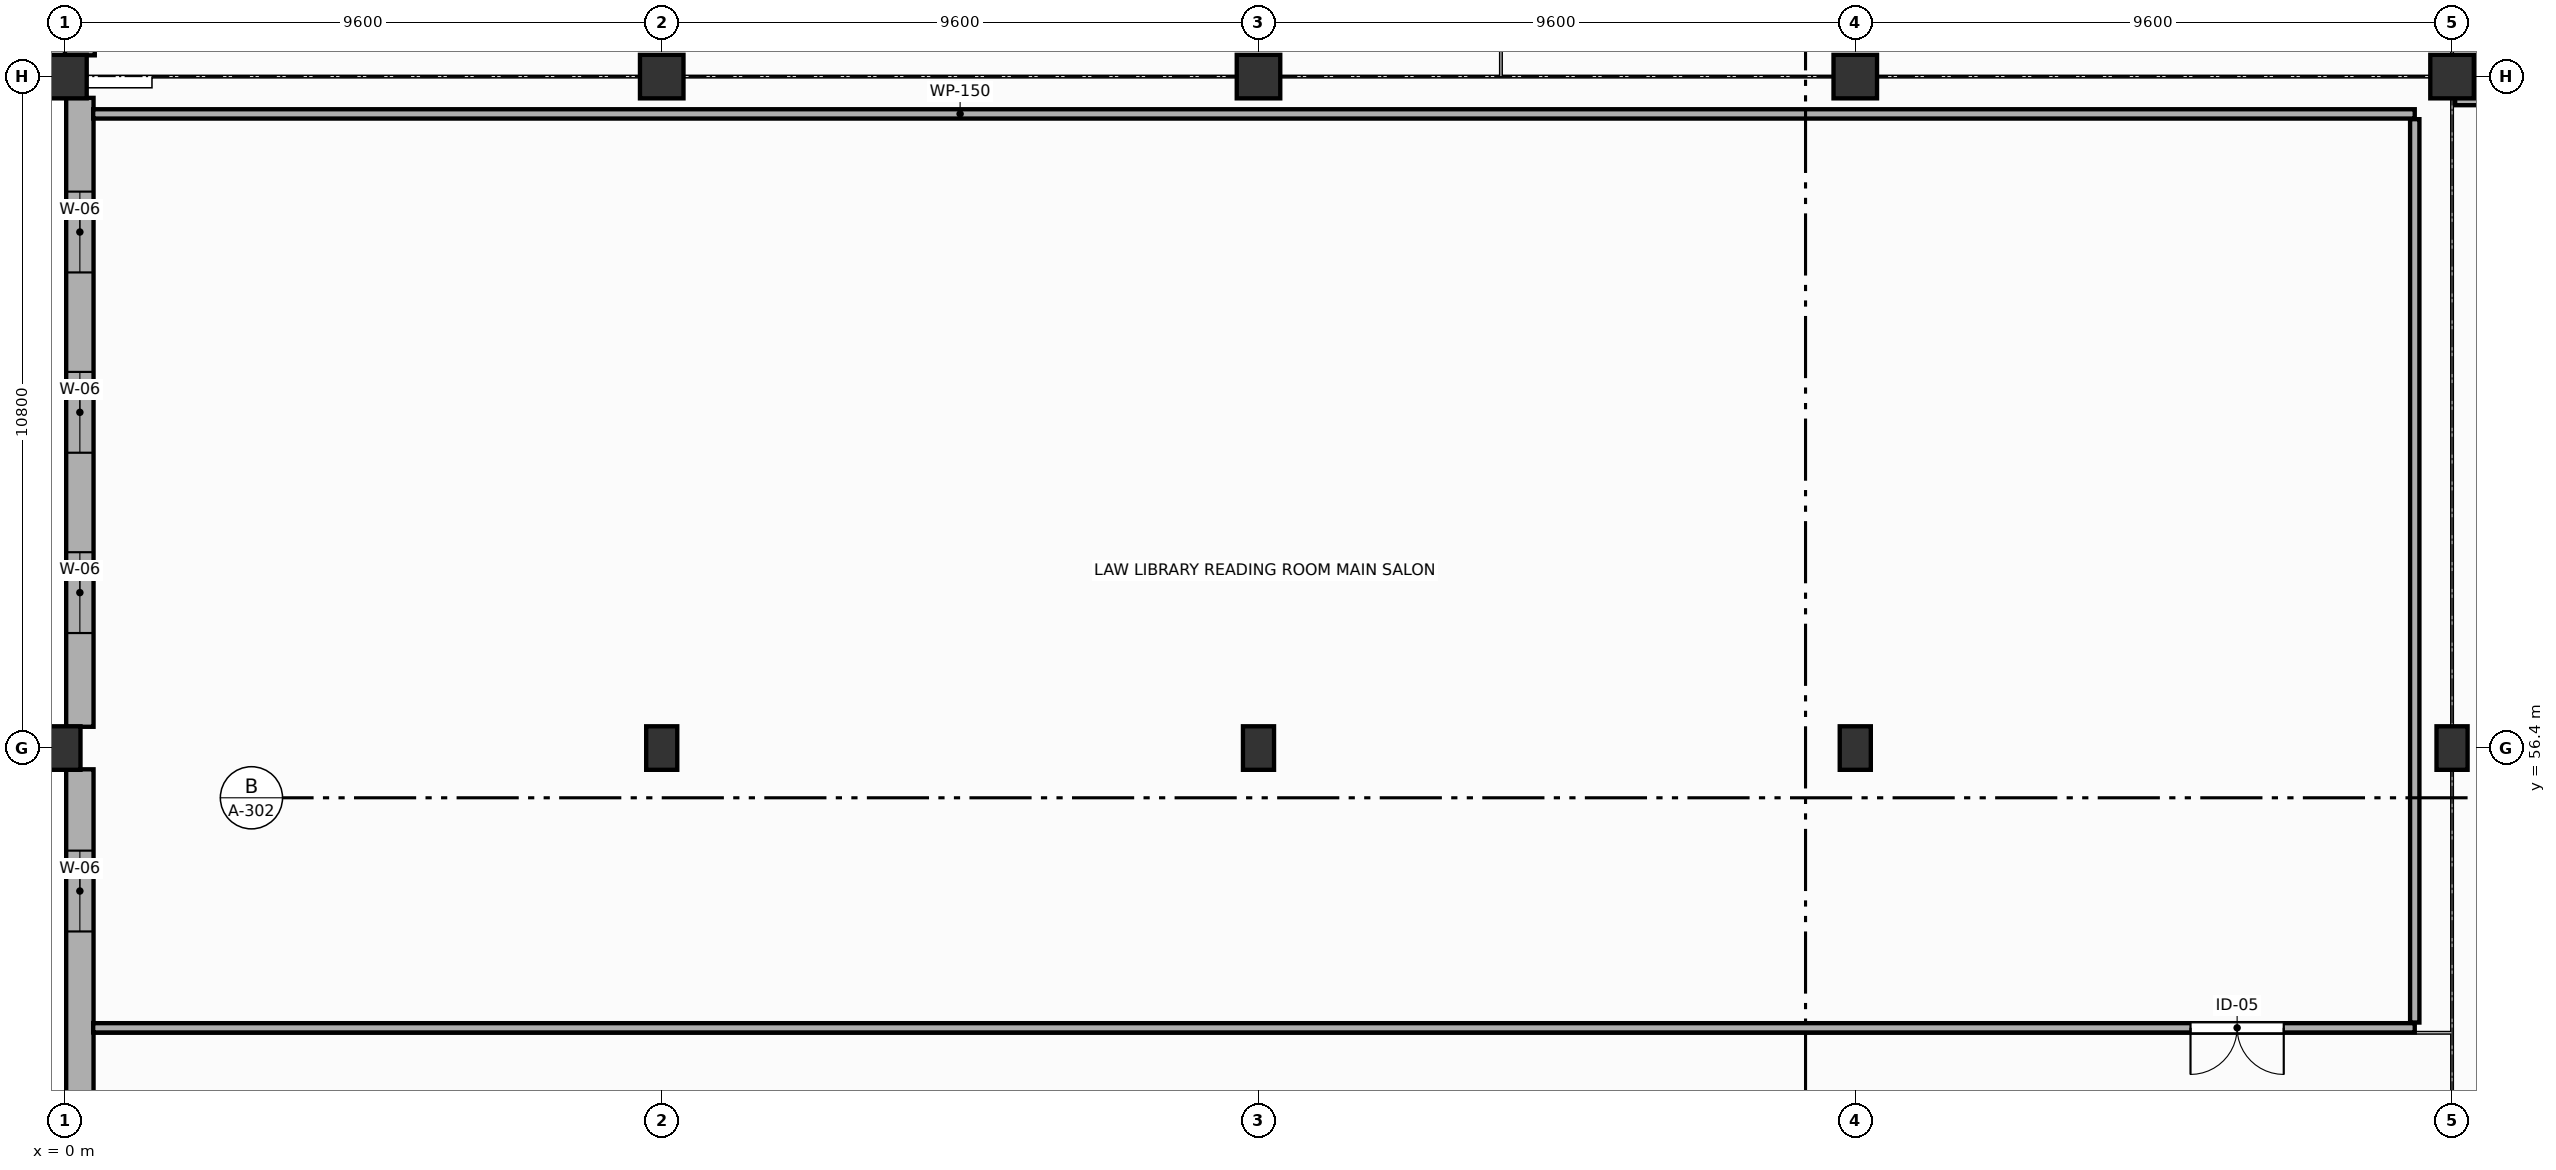
"""IFC4 building model, lengths in metres.
Left out: names, types, materials, properties, quantities, classifications, styles, units other than length and angle.
Written with IfcOpenShell. Run it as: python <this file> out.ifc"""

import sys

from ifc_helpers import new_model, si_unit, direction, frame, frame_2d, origin, origin_2d, place, context, subcontext, project, spatial, rectangle, extrude, element, fill, save


model = new_model("IFC4")
c1 = context("Model", 3, precision=1e-05, world=origin(), true_north=direction((0.0, 1.0)))
c2 = subcontext(c1, "Body", "Model", "MODEL_VIEW")
j1 = project(units=[si_unit("LENGTHUNIT", "METRE"), si_unit("PLANEANGLEUNIT", "RADIAN")], contexts=[c1])
p1 = place(None, origin())
s1 = spatial("IfcSite", under=j1, at=p1, CompositionType="ELEMENT")
p2 = place(p1, origin())
s2 = spatial("IfcBuilding", under=s1, at=p2, CompositionType="ELEMENT")
p3 = place(p2, frame((0.0, 0.0, 5.4)))
s3 = spatial("IfcBuildingStorey", under=s2, at=p3, CompositionType="ELEMENT", Elevation=5.4)
for number, where, z_axis, x_axis in (
    (1, (0.0, 67.2, 0.0), (0.0, 0.0, 1.0), (1.0, 0.0, 0.0)),
    (2, (9.6, 67.2, 0.0), (0.0, 0.0, 1.0), (1.0, 0.0, 0.0)),
    (3, (19.2, 67.2, 0.0), (0.0, 0.0, 1.0), (1.0, 0.0, 0.0)),
    (4, (28.8, 67.2, 0.0), (0.0, 0.0, 1.0), (1.0, 0.0, 0.0)),
    (5, (38.4, 67.2, 0.0), (0.0, 0.0, 1.0), (1.0, 0.0, 0.0)),
):
    element("IfcColumn", number, at=place(p3, frame(where, z_axis=z_axis, x_axis=x_axis)), inside=s3, PredefinedType="COLUMN", context=c2, shape_type="SweptSolid", body=[
        extrude(rectangle(XDim=0.7, YDim=0.7, at=origin_2d()), origin(), (0.0, 0.0, 1.0), 4.5),
    ])
for number, where, z_axis, x_axis in (
    (6, (0.0, 56.4, 0.0), (0.0, 0.0, 1.0), (1.0, 0.0, 0.0)),
    (7, (9.6, 56.4, 0.0), (0.0, 0.0, 1.0), (1.0, 0.0, 0.0)),
    (8, (19.2, 56.4, 0.0), (0.0, 0.0, 1.0), (1.0, 0.0, 0.0)),
    (9, (28.8, 56.4, 0.0), (0.0, 0.0, 1.0), (1.0, 0.0, 0.0)),
    (10, (38.4, 56.4, 0.0), (0.0, 0.0, 1.0), (1.0, 0.0, 0.0)),
):
    element("IfcColumn", number, at=place(p3, frame(where, z_axis=z_axis, x_axis=x_axis)), inside=s3, PredefinedType="COLUMN", context=c2, shape_type="SweptSolid", body=[
        extrude(rectangle(XDim=0.5, YDim=0.7, at=origin_2d()), origin(), (0.0, 0.0, 1.0), 4.5),
    ])
p4 = place(p3, frame((0.24, 67.542, 0.0), z_axis=(0.0, 0.0, 1.0), x_axis=(0.0, 1.0, 0.0)))
e11 = element("IfcWall", 11, at=p4, inside=s3, PredefinedType="STANDARD", context=c2, shape_type="SweptSolid", body=[
    extrude(rectangle(XDim=6.521, YDim=0.48, at=frame_2d((3.26, 0.0))), origin(), (0.0, 0.0, 1.0), 3.38),
])
p5 = place(p4, frame((1.303, 0.0, 0.85)))
e12 = element("IfcOpeningElement", 12, at=p5, cuts=e11, PredefinedType="OPENING", context=c2, shape_type="SweptSolid", body=[
    extrude(rectangle(XDim=1.7, YDim=2.3, at=frame_2d((0.85, 1.15))), frame((0.0, 0.25, 0.0), z_axis=(0.0, -1.0, 0.0), x_axis=(1.0, 0.0, 0.0)), (0.0, 0.0, 1.0), 0.5),
])
p6 = place(p4, frame((3.753, 0.0, 0.85)))
e13 = element("IfcOpeningElement", 13, at=p6, cuts=e11, PredefinedType="OPENING", context=c2, shape_type="SweptSolid", body=[
    extrude(rectangle(XDim=1.7, YDim=2.3, at=frame_2d((0.85, 1.15))), frame((0.0, 0.25, 0.0), z_axis=(0.0, -1.0, 0.0), x_axis=(1.0, 0.0, 0.0)), (0.0, 0.0, 1.0), 0.5),
])
p7 = place(p3, frame((0.24, 47.142, 0.0), z_axis=(0.0, 0.0, 1.0), x_axis=(0.0, 1.0, 0.0)))
e14 = element("IfcWall", 14, at=p7, inside=s3, PredefinedType="STANDARD", context=c2, shape_type="SweptSolid", body=[
    extrude(rectangle(XDim=8.916, YDim=0.44, at=frame_2d((4.458, 0.0))), origin(), (0.0, 0.0, 1.0), 3.38),
])
p8 = place(p7, frame((6.308, 0.0, 0.9)))
e15 = element("IfcOpeningElement", 15, at=p8, cuts=e14, PredefinedType="OPENING", context=c2, shape_type="SweptSolid", body=[
    extrude(rectangle(XDim=1.3, YDim=2.1, at=frame_2d((0.65, 1.05))), frame((0.0, 0.23, 0.0), z_axis=(0.0, -1.0, 0.0), x_axis=(1.0, 0.0, 0.0)), (0.0, 0.0, 1.0), 0.46),
])
p9 = place(p3, frame((0.24, 56.742, 0.0), z_axis=(0.0, 0.0, 1.0), x_axis=(0.0, 1.0, 0.0)))
e16 = element("IfcWall", 16, at=p9, inside=s3, PredefinedType="STANDARD", context=c2, shape_type="SweptSolid", body=[
    extrude(rectangle(XDim=10.116, YDim=0.44, at=frame_2d((5.058, 0.0))), origin(), (0.0, 0.0, 1.0), 3.38),
])
p10 = place(p9, frame((1.508, 0.0, 0.9)))
e17 = element("IfcOpeningElement", 17, at=p10, cuts=e16, PredefinedType="OPENING", context=c2, shape_type="SweptSolid", body=[
    extrude(rectangle(XDim=1.3, YDim=2.1, at=frame_2d((0.65, 1.05))), frame((0.0, 0.23, 0.0), z_axis=(0.0, -1.0, 0.0), x_axis=(1.0, 0.0, 0.0)), (0.0, 0.0, 1.0), 0.46),
])
p11 = place(p9, frame((4.408, 0.0, 0.9)))
e18 = element("IfcOpeningElement", 18, at=p11, cuts=e16, PredefinedType="OPENING", context=c2, shape_type="SweptSolid", body=[
    extrude(rectangle(XDim=1.3, YDim=2.1, at=frame_2d((0.65, 1.05))), frame((0.0, 0.23, 0.0), z_axis=(0.0, -1.0, 0.0), x_axis=(1.0, 0.0, 0.0)), (0.0, 0.0, 1.0), 0.46),
])
p12 = place(p9, frame((7.308, 0.0, 0.9)))
e19 = element("IfcOpeningElement", 19, at=p12, cuts=e16, PredefinedType="OPENING", context=c2, shape_type="SweptSolid", body=[
    extrude(rectangle(XDim=1.3, YDim=2.1, at=frame_2d((0.65, 1.05))), frame((0.0, 0.23, 0.0), z_axis=(0.0, -1.0, 0.0), x_axis=(1.0, 0.0, 0.0)), (0.0, 0.0, 1.0), 0.46),
])
p13 = place(p3, frame((38.45, 66.96, 0.0), z_axis=(0.0, 0.0, 1.0), x_axis=(1.0, 0.0, 0.0)))
e20 = element("IfcWall", 20, at=p13, inside=s3, PredefinedType="STANDARD", context=c2, shape_type="SweptSolid", body=[
    extrude(rectangle(XDim=7.55, YDim=0.44, at=frame_2d((3.775, 0.0))), origin(), (0.0, 0.0, 1.0), 3.23),
])
p14 = place(p3, frame((0.454, 66.6, 0.0), z_axis=(0.0, 0.0, 1.0), x_axis=(1.0, 0.0, 0.0)))
e21 = element("IfcWall", 21, at=p14, inside=s3, PredefinedType="PARTITIONING", context=c2, shape_type="SweptSolid", body=[
    extrude(rectangle(XDim=37.346, YDim=0.15, at=frame_2d((18.673, 0.0))), origin(), (0.0, 0.0, 1.0), 3.38),
])
p15 = place(p3, frame((37.8, 51.9, 0.0), z_axis=(0.0, 0.0, 1.0), x_axis=(-1.0, 0.0, 0.0)))
e22 = element("IfcWall", 22, at=p15, inside=s3, PredefinedType="PARTITIONING", context=c2, shape_type="SweptSolid", body=[
    extrude(rectangle(XDim=37.346, YDim=0.15, at=frame_2d((18.673, 0.0))), origin(), (0.0, 0.0, 1.0), 3.23),
])
p16 = place(p15, frame((2.107, 0.0, 0.0)))
e23 = element("IfcOpeningElement", 23, at=p16, cuts=e22, PredefinedType="OPENING", context=c2, shape_type="SweptSolid", body=[
    extrude(rectangle(XDim=1.5, YDim=2.35, at=frame_2d((0.75, 1.175))), frame((0.0, 0.085, 0.0), z_axis=(0.0, -1.0, 0.0), x_axis=(1.0, 0.0, 0.0)), (0.0, 0.0, 1.0), 0.17),
])
p17 = place(p3, frame((37.8, 66.515, 0.0), z_axis=(0.0, 0.0, 1.0), x_axis=(0.0, -1.0, 0.0)))
e24 = element("IfcWall", 24, at=p17, inside=s3, PredefinedType="PARTITIONING", context=c2, shape_type="SweptSolid", body=[
    extrude(rectangle(XDim=14.53, YDim=0.15, at=frame_2d((7.265, 0.0))), origin(), (0.0, 0.0, 1.0), 3.43),
])
p18 = place(p8, origin())
e25 = element("IfcWindow", 25, at=p18, inside=s3, PartitioningType="SINGLE_PANEL", PredefinedType="WINDOW", context=c2, shape_type="SweptSolid", body=[
    extrude(rectangle(XDim=1.3, YDim=2.1, at=frame_2d((0.65, 1.05))), frame((0.0, 0.03, 0.0), z_axis=(0.0, -1.0, 0.0), x_axis=(1.0, 0.0, 0.0)), (0.0, 0.0, 1.0), 0.06),
])
fill(e15, e25)
p19 = place(p10, origin())
e26 = element("IfcWindow", 26, at=p19, inside=s3, PartitioningType="SINGLE_PANEL", PredefinedType="WINDOW", context=c2, shape_type="SweptSolid", body=[
    extrude(rectangle(XDim=1.3, YDim=2.1, at=frame_2d((0.65, 1.05))), frame((0.0, 0.03, 0.0), z_axis=(0.0, -1.0, 0.0), x_axis=(1.0, 0.0, 0.0)), (0.0, 0.0, 1.0), 0.06),
])
fill(e17, e26)
p20 = place(p11, origin())
e27 = element("IfcWindow", 27, at=p20, inside=s3, PartitioningType="SINGLE_PANEL", PredefinedType="WINDOW", context=c2, shape_type="SweptSolid", body=[
    extrude(rectangle(XDim=1.3, YDim=2.1, at=frame_2d((0.65, 1.05))), frame((0.0, 0.03, 0.0), z_axis=(0.0, -1.0, 0.0), x_axis=(1.0, 0.0, 0.0)), (0.0, 0.0, 1.0), 0.06),
])
fill(e18, e27)
p21 = place(p12, origin())
e28 = element("IfcWindow", 28, at=p21, inside=s3, PartitioningType="SINGLE_PANEL", PredefinedType="WINDOW", context=c2, shape_type="SweptSolid", body=[
    extrude(rectangle(XDim=1.3, YDim=2.1, at=frame_2d((0.65, 1.05))), frame((0.0, 0.03, 0.0), z_axis=(0.0, -1.0, 0.0), x_axis=(1.0, 0.0, 0.0)), (0.0, 0.0, 1.0), 0.06),
])
fill(e19, e28)
p22 = place(p16, origin())
e29 = element("IfcDoor", 29, at=p22, inside=s3, OperationType="DOUBLE_DOOR_SINGLE_SWING", PredefinedType="DOOR", context=c2, shape_type="SweptSolid", body=[
    extrude(rectangle(XDim=1.5, YDim=2.35, at=frame_2d((0.75, 1.175))), frame((0.0, 0.025, 0.0), z_axis=(0.0, -1.0, 0.0), x_axis=(1.0, 0.0, 0.0)), (0.0, 0.0, 1.0), 0.05),
])
fill(e23, e29)
save(model, sys.argv[1])
